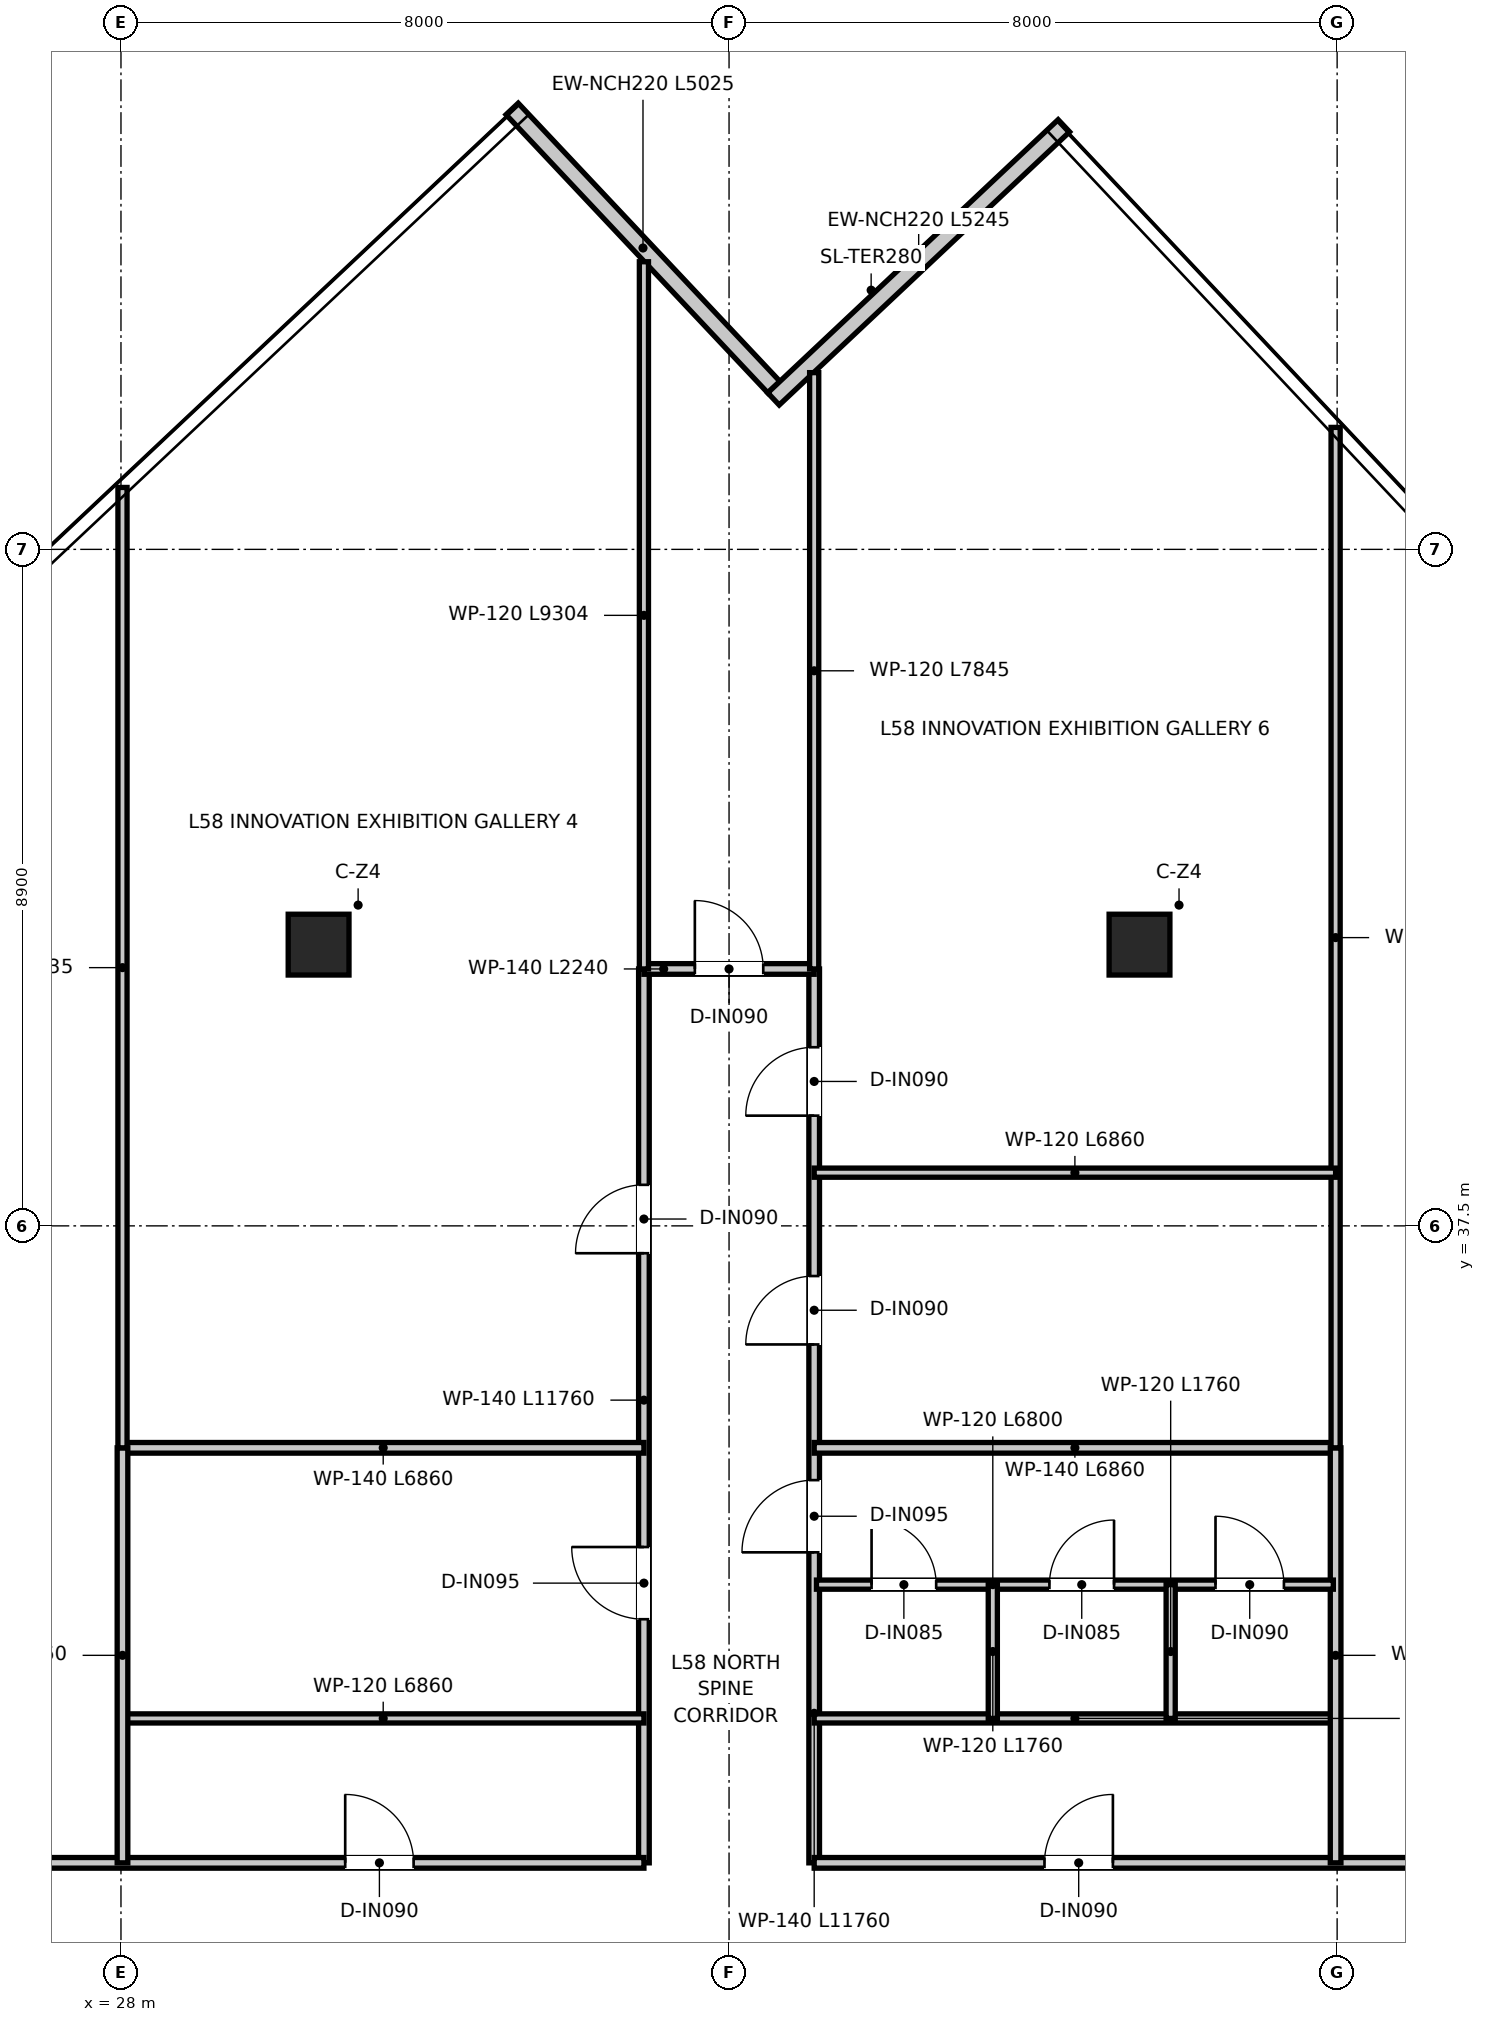
"""IFC4 building model, lengths in metres.
Left out: names, types, materials, properties, quantities, classifications, styles, units other than length and angle.
Written with IfcOpenShell. Run it as: python <this file> out.ifc"""

import sys

from ifc_helpers import new_model, si_unit, direction, frame, frame_2d, origin, origin_2d, place, context, subcontext, project, spatial, rectangle, extrude, source, transform, mapped, element, fill, save


model = new_model("IFC4")
c1 = context("Model", 3, precision=1e-05, world=origin(), true_north=direction((0.0, 1.0)))
c2 = subcontext(c1, "Body", "Model", "MODEL_VIEW")
j1 = project(units=[si_unit("LENGTHUNIT", "METRE"), si_unit("PLANEANGLEUNIT", "RADIAN")], contexts=[c1])
p1 = place(None, origin())
s1 = spatial("IfcSite", under=j1, at=p1, CompositionType="ELEMENT")
p2 = place(p1, origin())
s2 = spatial("IfcBuilding", under=s1, at=p2, CompositionType="ELEMENT")
p3 = place(p2, frame((0.0, 0.0, 238.9)))
s3 = spatial("IfcBuildingStorey", under=s2, at=p3, CompositionType="ELEMENT", Elevation=238.9)
m1 = source(origin(), c2, "Body", "SweptSolid", [
    extrude(rectangle(XDim=0.8, YDim=0.8, at=origin_2d()), origin(), (0.0, 0.0, 1.0), 3.95),
])
for number, where, z_axis, x_axis in (
    (1, (30.6, 41.2, 0.0), (0.0, 0.0, 1.0), (1.0, 0.0, 0.0)),
    (2, (41.4, 41.2, 0.0), (0.0, 0.0, 1.0), (1.0, 0.0, 0.0)),
):
    element("IfcColumn", number, at=place(p3, frame(where, z_axis=z_axis, x_axis=x_axis)), inside=s3, PredefinedType="COLUMN", context=c2, shape_type="MappedRepresentation", body=[
        mapped(m1, transform((0.0, 0.0, 0.0), x_axis=(1.0, 0.0, 0.0), y_axis=(0.0, 1.0, 0.0), z_axis=(0.0, 0.0, 1.0), scale=1.0)),
    ])
p4 = place(p3, frame((36.589, 48.535, 0.0), z_axis=(0.0, 0.0, 1.0), x_axis=(-0.685181305796, 0.728372554527, 0.0)))
e3 = element("IfcWall", 3, at=p4, inside=s3, PredefinedType="ELEMENTEDWALL", context=c2, shape_type="SweptSolid", body=[
    extrude(rectangle(XDim=5.025, YDim=0.22, at=frame_2d((2.513, 0.0))), origin(), (0.0, 0.0, 1.0), 3.67),
])
p5 = place(p3, frame((40.405, 51.973, 0.0), z_axis=(0.0, 0.0, 1.0), x_axis=(-0.728374884992, -0.685178828418, 0.0)))
e4 = element("IfcWall", 4, at=p5, inside=s3, PredefinedType="ELEMENTEDWALL", context=c2, shape_type="SweptSolid", body=[
    extrude(rectangle(XDim=5.245, YDim=0.22, at=frame_2d((2.623, 0.0))), origin(), (0.0, 0.0, 1.0), 3.67),
])
p6 = place(p3, frame((34.88, 29.12, 0.0), z_axis=(0.0, 0.0, 1.0), x_axis=(0.0, 1.0, 0.0)))
e5 = element("IfcWall", 5, at=p6, inside=s3, PredefinedType="PARTITIONING", context=c2, shape_type="SweptSolid", body=[
    extrude(rectangle(XDim=11.76, YDim=0.14, at=frame_2d((5.88, 0.0))), origin(), (0.0, 0.0, 1.0), 3.03),
])
p7 = place(p6, frame((3.205, 0.0, 0.0)))
e6 = element("IfcOpeningElement", 6, at=p7, cuts=e5, PredefinedType="OPENING", context=c2, shape_type="SweptSolid", body=[
    extrude(rectangle(XDim=0.95, YDim=2.1, at=frame_2d((0.475, 1.05))), frame((0.0, 0.08, 0.0), z_axis=(0.0, -1.0, 0.0), x_axis=(1.0, 0.0, 0.0)), (0.0, 0.0, 1.0), 0.16),
])
p8 = place(p6, frame((8.02, 0.0, 0.0)))
e7 = element("IfcOpeningElement", 7, at=p8, cuts=e5, PredefinedType="OPENING", context=c2, shape_type="SweptSolid", body=[
    extrude(rectangle(XDim=0.9, YDim=2.1, at=frame_2d((0.45, 1.05))), frame((0.0, 0.08, 0.0), z_axis=(0.0, -1.0, 0.0), x_axis=(1.0, 0.0, 0.0)), (0.0, 0.0, 1.0), 0.16),
])
p9 = place(p3, frame((37.12, 29.12, 0.0), z_axis=(0.0, 0.0, 1.0), x_axis=(0.0, 1.0, 0.0)))
e8 = element("IfcWall", 8, at=p9, inside=s3, PredefinedType="PARTITIONING", context=c2, shape_type="SweptSolid", body=[
    extrude(rectangle(XDim=11.76, YDim=0.14, at=frame_2d((5.88, 0.0))), origin(), (0.0, 0.0, 1.0), 3.03),
])
p10 = place(p9, frame((4.085, 0.0, 0.0)))
e9 = element("IfcOpeningElement", 9, at=p10, cuts=e8, PredefinedType="OPENING", context=c2, shape_type="SweptSolid", body=[
    extrude(rectangle(XDim=0.95, YDim=2.1, at=frame_2d((0.475, 1.05))), frame((0.0, 0.08, 0.0), z_axis=(0.0, -1.0, 0.0), x_axis=(1.0, 0.0, 0.0)), (0.0, 0.0, 1.0), 0.16),
])
p11 = place(p9, frame((6.82, 0.0, 0.0)))
e10 = element("IfcOpeningElement", 10, at=p11, cuts=e8, PredefinedType="OPENING", context=c2, shape_type="SweptSolid", body=[
    extrude(rectangle(XDim=0.9, YDim=2.1, at=frame_2d((0.45, 1.05))), frame((0.0, 0.08, 0.0), z_axis=(0.0, -1.0, 0.0), x_axis=(1.0, 0.0, 0.0)), (0.0, 0.0, 1.0), 0.16),
])
p12 = place(p9, frame((9.83, 0.0, 0.0)))
e11 = element("IfcOpeningElement", 11, at=p12, cuts=e8, PredefinedType="OPENING", context=c2, shape_type="SweptSolid", body=[
    extrude(rectangle(XDim=0.9, YDim=2.1, at=frame_2d((0.45, 1.05))), frame((0.0, 0.08, 0.0), z_axis=(0.0, -1.0, 0.0), x_axis=(1.0, 0.0, 0.0)), (0.0, 0.0, 1.0), 0.16),
])
p13 = place(p3, frame((34.88, 40.88, 0.0), z_axis=(0.0, 0.0, 1.0), x_axis=(1.0, 0.0, 0.0)))
e12 = element("IfcWall", 12, at=p13, inside=s3, PredefinedType="PARTITIONING", context=c2, shape_type="SweptSolid", body=[
    extrude(rectangle(XDim=2.24, YDim=0.14, at=frame_2d((1.12, 0.0))), origin(), (0.0, 0.0, 1.0), 3.67),
])
p14 = place(p13, frame((0.67, 0.0, 0.0)))
e13 = element("IfcOpeningElement", 13, at=p14, cuts=e12, PredefinedType="OPENING", context=c2, shape_type="SweptSolid", body=[
    extrude(rectangle(XDim=0.9, YDim=2.1, at=frame_2d((0.45, 1.05))), frame((0.0, 0.08, 0.0), z_axis=(0.0, -1.0, 0.0), x_axis=(1.0, 0.0, 0.0)), (0.0, 0.0, 1.0), 0.16),
])
p15 = place(p3, frame((12.752, 29.12, 0.0), z_axis=(0.0, 0.0, 1.0), x_axis=(1.0, 0.0, 0.0)))
e14 = element("IfcWall", 14, at=p15, inside=s3, PredefinedType="PARTITIONING", context=c2, shape_type="SweptSolid", body=[
    extrude(rectangle(XDim=22.128, YDim=0.14, at=frame_2d((11.064, 0.0))), origin(), (0.0, 0.0, 1.0), 3.03),
])
p16 = place(p15, frame((18.198, 0.0, 0.0)))
e15 = element("IfcOpeningElement", 15, at=p16, cuts=e14, PredefinedType="OPENING", context=c2, shape_type="SweptSolid", body=[
    extrude(rectangle(XDim=0.9, YDim=2.1, at=frame_2d((0.45, 1.05))), frame((0.0, 0.08, 0.0), z_axis=(0.0, -1.0, 0.0), x_axis=(1.0, 0.0, 0.0)), (0.0, 0.0, 1.0), 0.16),
])
p17 = place(p15, frame((4.178, 0.0, 0.0)))
e16 = element("IfcOpeningElement", 16, at=p17, cuts=e14, PredefinedType="OPENING", context=c2, shape_type="SweptSolid", body=[
    extrude(rectangle(XDim=0.9, YDim=2.1, at=frame_2d((0.45, 1.05))), frame((0.0, 0.08, 0.0), z_axis=(0.0, -1.0, 0.0), x_axis=(1.0, 0.0, 0.0)), (0.0, 0.0, 1.0), 0.16),
])
p18 = place(p15, frame((12.198, 0.0, 0.0)))
e17 = element("IfcOpeningElement", 17, at=p18, cuts=e14, PredefinedType="OPENING", context=c2, shape_type="SweptSolid", body=[
    extrude(rectangle(XDim=0.9, YDim=2.1, at=frame_2d((0.45, 1.05))), frame((0.0, 0.08, 0.0), z_axis=(0.0, -1.0, 0.0), x_axis=(1.0, 0.0, 0.0)), (0.0, 0.0, 1.0), 0.16),
])
p19 = place(p3, frame((37.12, 29.12, 0.0), z_axis=(0.0, 0.0, 1.0), x_axis=(1.0, 0.0, 0.0)))
e18 = element("IfcWall", 18, at=p19, inside=s3, PredefinedType="PARTITIONING", context=c2, shape_type="SweptSolid", body=[
    extrude(rectangle(XDim=23.746, YDim=0.14, at=frame_2d((11.873, 0.0))), origin(), (0.0, 0.0, 1.0), 3.03),
])
p20 = place(p19, frame((3.03, 0.0, 0.0)))
e19 = element("IfcOpeningElement", 19, at=p20, cuts=e18, PredefinedType="OPENING", context=c2, shape_type="SweptSolid", body=[
    extrude(rectangle(XDim=0.9, YDim=2.1, at=frame_2d((0.45, 1.05))), frame((0.0, 0.08, 0.0), z_axis=(0.0, -1.0, 0.0), x_axis=(1.0, 0.0, 0.0)), (0.0, 0.0, 1.0), 0.16),
])
p21 = place(p19, frame((14.64, 0.0, 0.0)))
e20 = element("IfcOpeningElement", 20, at=p21, cuts=e18, PredefinedType="OPENING", context=c2, shape_type="SweptSolid", body=[
    extrude(rectangle(XDim=0.9, YDim=2.1, at=frame_2d((0.45, 1.05))), frame((0.0, 0.08, 0.0), z_axis=(0.0, -1.0, 0.0), x_axis=(1.0, 0.0, 0.0)), (0.0, 0.0, 1.0), 0.16),
])
for number, where, z_axis, x_axis in (
    (21, (28.02, 31.02, 0.0), (0.0, 0.0, 1.0), (1.0, 0.0, 0.0)),
    (22, (37.12, 31.02, 0.0), (0.0, 0.0, 1.0), (1.0, 0.0, 0.0)),
):
    element("IfcWall", number, at=place(p3, frame(where, z_axis=z_axis, x_axis=x_axis)), inside=s3, PredefinedType="PARTITIONING", context=c2, shape_type="SweptSolid", body=[
        extrude(rectangle(XDim=6.86, YDim=0.12, at=frame_2d((3.43, 0.0))), origin(), (0.0, 0.0, 1.0), 3.18),
    ])
for number, where, z_axis, x_axis in (
    (23, (28.02, 34.58, 0.0), (0.0, 0.0, 1.0), (1.0, 0.0, 0.0)),
    (24, (37.12, 34.58, 0.0), (0.0, 0.0, 1.0), (1.0, 0.0, 0.0)),
):
    element("IfcWall", number, at=place(p3, frame(where, z_axis=z_axis, x_axis=x_axis)), inside=s3, PredefinedType="PARTITIONING", context=c2, shape_type="SweptSolid", body=[
        extrude(rectangle(XDim=6.86, YDim=0.14, at=frame_2d((3.43, 0.0))), origin(), (0.0, 0.0, 1.0), 3.18),
    ])
for number, where, z_axis, x_axis in (
    (25, (28.02, 29.12, 0.0), (0.0, 0.0, 1.0), (0.0, 1.0, 0.0)),
    (26, (43.98, 29.12, 0.0), (0.0, 0.0, 1.0), (0.0, 1.0, 0.0)),
):
    element("IfcWall", number, at=place(p3, frame(where, z_axis=z_axis, x_axis=x_axis)), inside=s3, PredefinedType="PARTITIONING", context=c2, shape_type="SweptSolid", body=[
        extrude(rectangle(XDim=5.46, YDim=0.14, at=frame_2d((2.73, 0.0))), origin(), (0.0, 0.0, 1.0), 3.37),
    ])
p22 = place(p3, frame((37.15, 32.78, 0.0), z_axis=(0.0, 0.0, 1.0), x_axis=(1.0, 0.0, 0.0)))
e27 = element("IfcWall", 27, at=p22, inside=s3, PredefinedType="PARTITIONING", context=c2, shape_type="SweptSolid", body=[
    extrude(rectangle(XDim=6.8, YDim=0.12, at=frame_2d((3.4, 0.0))), origin(), (0.0, 0.0, 1.0), 3.18),
])
p23 = place(p22, frame((0.725, 0.0, 0.0)))
e28 = element("IfcOpeningElement", 28, at=p23, cuts=e27, PredefinedType="OPENING", context=c2, shape_type="SweptSolid", body=[
    extrude(rectangle(XDim=0.85, YDim=2.1, at=frame_2d((0.425, 1.05))), frame((0.0, 0.07, 0.0), z_axis=(0.0, -1.0, 0.0), x_axis=(1.0, 0.0, 0.0)), (0.0, 0.0, 1.0), 0.14),
])
p24 = place(p22, frame((3.065, 0.0, 0.0)))
e29 = element("IfcOpeningElement", 29, at=p24, cuts=e27, PredefinedType="OPENING", context=c2, shape_type="SweptSolid", body=[
    extrude(rectangle(XDim=0.85, YDim=2.1, at=frame_2d((0.425, 1.05))), frame((0.0, 0.07, 0.0), z_axis=(0.0, -1.0, 0.0), x_axis=(1.0, 0.0, 0.0)), (0.0, 0.0, 1.0), 0.14),
])
p25 = place(p22, frame((5.25, 0.0, 0.0)))
e30 = element("IfcOpeningElement", 30, at=p25, cuts=e27, PredefinedType="OPENING", context=c2, shape_type="SweptSolid", body=[
    extrude(rectangle(XDim=0.9, YDim=2.1, at=frame_2d((0.45, 1.05))), frame((0.0, 0.07, 0.0), z_axis=(0.0, -1.0, 0.0), x_axis=(1.0, 0.0, 0.0)), (0.0, 0.0, 1.0), 0.14),
])
for number, where, z_axis, x_axis in (
    (31, (39.47, 31.02, 0.0), (0.0, 0.0, 1.0), (0.0, 1.0, 0.0)),
    (32, (41.81, 31.02, 0.0), (0.0, 0.0, 1.0), (0.0, 1.0, 0.0)),
):
    element("IfcWall", number, at=place(p3, frame(where, z_axis=z_axis, x_axis=x_axis)), inside=s3, PredefinedType="PARTITIONING", context=c2, shape_type="SweptSolid", body=[
        extrude(rectangle(XDim=1.76, YDim=0.12, at=frame_2d((0.88, 0.0))), origin(), (0.0, 0.0, 1.0), 3.67),
    ])
p26 = place(p3, frame((34.88, 40.88, 0.0), z_axis=(0.0, 0.0, 1.0), x_axis=(0.0, 1.0, 0.0)))
e33 = element("IfcWall", 33, at=p26, inside=s3, PredefinedType="PARTITIONING", context=c2, shape_type="SweptSolid", body=[
    extrude(rectangle(XDim=9.304, YDim=0.12, at=frame_2d((4.652, 0.0))), origin(), (0.0, 0.0, 1.0), 3.28),
])
p27 = place(p3, frame((37.12, 40.88, 0.0), z_axis=(0.0, 0.0, 1.0), x_axis=(0.0, 1.0, 0.0)))
e34 = element("IfcWall", 34, at=p27, inside=s3, PredefinedType="PARTITIONING", context=c2, shape_type="SweptSolid", body=[
    extrude(rectangle(XDim=7.845, YDim=0.12, at=frame_2d((3.923, 0.0))), origin(), (0.0, 0.0, 1.0), 3.28),
])
p28 = place(p3, frame((28.02, 34.58, 0.0), z_axis=(0.0, 0.0, 1.0), x_axis=(0.0, 1.0, 0.0)))
e35 = element("IfcWall", 35, at=p28, inside=s3, PredefinedType="PARTITIONING", context=c2, shape_type="SweptSolid", body=[
    extrude(rectangle(XDim=12.635, YDim=0.12, at=frame_2d((6.317, 0.0))), origin(), (0.0, 0.0, 1.0), 3.03),
])
p29 = place(p3, frame((43.98, 34.58, 0.0), z_axis=(0.0, 0.0, 1.0), x_axis=(0.0, 1.0, 0.0)))
e36 = element("IfcWall", 36, at=p29, inside=s3, PredefinedType="PARTITIONING", context=c2, shape_type="SweptSolid", body=[
    extrude(rectangle(XDim=13.425, YDim=0.12, at=frame_2d((6.712, 0.0))), origin(), (0.0, 0.0, 1.0), 3.03),
])
p30 = place(p3, frame((37.12, 38.2, 0.0), z_axis=(0.0, 0.0, 1.0), x_axis=(1.0, 0.0, 0.0)))
e37 = element("IfcWall", 37, at=p30, inside=s3, PredefinedType="PARTITIONING", context=c2, shape_type="SweptSolid", body=[
    extrude(rectangle(XDim=6.86, YDim=0.12, at=frame_2d((3.43, 0.0))), origin(), (0.0, 0.0, 1.0), 3.18),
])
p31 = place(p16, origin())
e38 = element("IfcDoor", 38, at=p31, inside=s3, OperationType="SINGLE_SWING_LEFT", PredefinedType="DOOR", context=c2, shape_type="SweptSolid", body=[
    extrude(rectangle(XDim=0.9, YDim=2.1, at=frame_2d((0.45, 1.05))), frame((0.0, 0.025, 0.0), z_axis=(0.0, -1.0, 0.0), x_axis=(1.0, 0.0, 0.0)), (0.0, 0.0, 1.0), 0.05),
])
fill(e15, e38)
p32 = place(p20, origin())
e39 = element("IfcDoor", 39, at=p32, inside=s3, OperationType="SINGLE_SWING_RIGHT", PredefinedType="DOOR", context=c2, shape_type="SweptSolid", body=[
    extrude(rectangle(XDim=0.9, YDim=2.1, at=frame_2d((0.45, 1.05))), frame((0.0, 0.025, 0.0), z_axis=(0.0, -1.0, 0.0), x_axis=(1.0, 0.0, 0.0)), (0.0, 0.0, 1.0), 0.05),
])
fill(e19, e39)
p33 = place(p10, origin())
e40 = element("IfcDoor", 40, at=p33, inside=s3, OperationType="SINGLE_SWING_LEFT", PredefinedType="DOOR", context=c2, shape_type="SweptSolid", body=[
    extrude(rectangle(XDim=0.95, YDim=2.1, at=frame_2d((0.475, 1.05))), frame((0.0, 0.025, 0.0), z_axis=(0.0, -1.0, 0.0), x_axis=(1.0, 0.0, 0.0)), (0.0, 0.0, 1.0), 0.05),
])
fill(e9, e40)
p34 = place(p7, origin())
e41 = element("IfcDoor", 41, at=p34, inside=s3, OperationType="SINGLE_SWING_RIGHT", PredefinedType="DOOR", context=c2, shape_type="SweptSolid", body=[
    extrude(rectangle(XDim=0.95, YDim=2.1, at=frame_2d((0.475, 1.05))), frame((0.0, 0.025, 0.0), z_axis=(0.0, -1.0, 0.0), x_axis=(1.0, 0.0, 0.0)), (0.0, 0.0, 1.0), 0.05),
])
fill(e6, e41)
p35 = place(p23, origin())
e42 = element("IfcDoor", 42, at=p35, inside=s3, OperationType="SINGLE_SWING_LEFT", PredefinedType="DOOR", context=c2, shape_type="SweptSolid", body=[
    extrude(rectangle(XDim=0.85, YDim=2.1, at=frame_2d((0.425, 1.05))), frame((0.0, 0.025, 0.0), z_axis=(0.0, -1.0, 0.0), x_axis=(1.0, 0.0, 0.0)), (0.0, 0.0, 1.0), 0.05),
])
fill(e28, e42)
p36 = place(p24, origin())
e43 = element("IfcDoor", 43, at=p36, inside=s3, OperationType="SINGLE_SWING_RIGHT", PredefinedType="DOOR", context=c2, shape_type="SweptSolid", body=[
    extrude(rectangle(XDim=0.85, YDim=2.1, at=frame_2d((0.425, 1.05))), frame((0.0, 0.025, 0.0), z_axis=(0.0, -1.0, 0.0), x_axis=(1.0, 0.0, 0.0)), (0.0, 0.0, 1.0), 0.05),
])
fill(e29, e43)
p37 = place(p25, origin())
e44 = element("IfcDoor", 44, at=p37, inside=s3, OperationType="SINGLE_SWING_LEFT", PredefinedType="DOOR", context=c2, shape_type="SweptSolid", body=[
    extrude(rectangle(XDim=0.9, YDim=2.1, at=frame_2d((0.45, 1.05))), frame((0.0, 0.025, 0.0), z_axis=(0.0, -1.0, 0.0), x_axis=(1.0, 0.0, 0.0)), (0.0, 0.0, 1.0), 0.05),
])
fill(e30, e44)
p38 = place(p14, origin())
e45 = element("IfcDoor", 45, at=p38, inside=s3, OperationType="SINGLE_SWING_LEFT", PredefinedType="DOOR", context=c2, shape_type="SweptSolid", body=[
    extrude(rectangle(XDim=0.9, YDim=2.1, at=frame_2d((0.45, 1.05))), frame((0.0, 0.025, 0.0), z_axis=(0.0, -1.0, 0.0), x_axis=(1.0, 0.0, 0.0)), (0.0, 0.0, 1.0), 0.05),
])
fill(e13, e45)
p39 = place(p8, origin())
e46 = element("IfcDoor", 46, at=p39, inside=s3, OperationType="SINGLE_SWING_LEFT", PredefinedType="DOOR", context=c2, shape_type="SweptSolid", body=[
    extrude(rectangle(XDim=0.9, YDim=2.1, at=frame_2d((0.45, 1.05))), frame((0.0, 0.025, 0.0), z_axis=(0.0, -1.0, 0.0), x_axis=(1.0, 0.0, 0.0)), (0.0, 0.0, 1.0), 0.05),
])
fill(e7, e46)
p40 = place(p11, origin())
e47 = element("IfcDoor", 47, at=p40, inside=s3, OperationType="SINGLE_SWING_LEFT", PredefinedType="DOOR", context=c2, shape_type="SweptSolid", body=[
    extrude(rectangle(XDim=0.9, YDim=2.1, at=frame_2d((0.45, 1.05))), frame((0.0, 0.025, 0.0), z_axis=(0.0, -1.0, 0.0), x_axis=(1.0, 0.0, 0.0)), (0.0, 0.0, 1.0), 0.05),
])
fill(e10, e47)
p41 = place(p12, origin())
e48 = element("IfcDoor", 48, at=p41, inside=s3, OperationType="SINGLE_SWING_LEFT", PredefinedType="DOOR", context=c2, shape_type="SweptSolid", body=[
    extrude(rectangle(XDim=0.9, YDim=2.1, at=frame_2d((0.45, 1.05))), frame((0.0, 0.025, 0.0), z_axis=(0.0, -1.0, 0.0), x_axis=(1.0, 0.0, 0.0)), (0.0, 0.0, 1.0), 0.05),
])
fill(e11, e48)
save(model, sys.argv[1])
